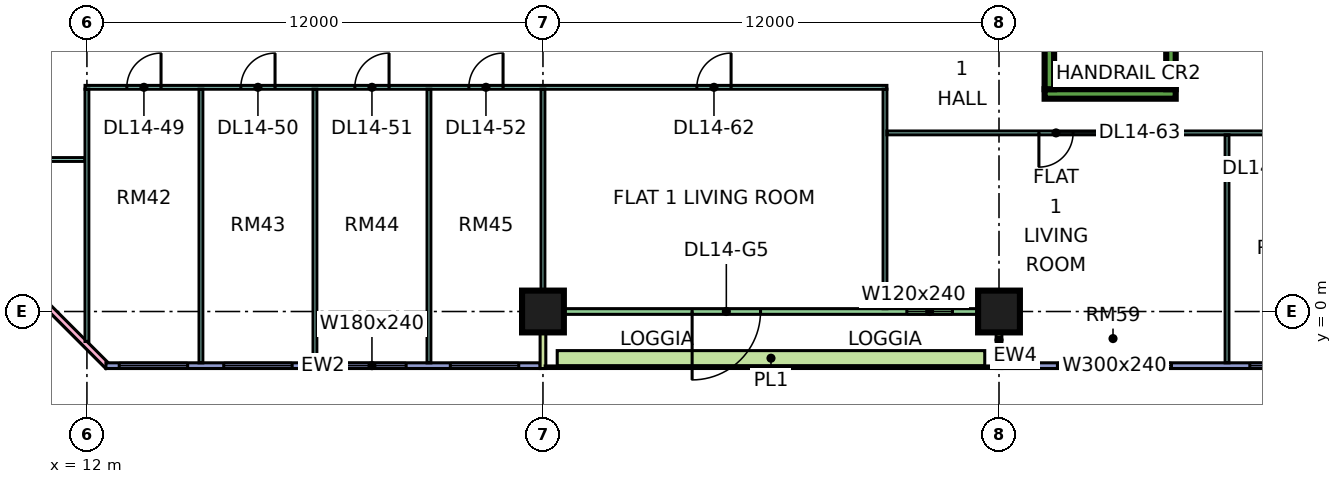
"""IFC4 building model, lengths in metres.
Left out: names, types, materials, properties, quantities, classifications, styles, units other than length and angle.
Written with IfcOpenShell. Run it as: python <this file> out.ifc"""

import sys

from ifc_helpers import new_model, si_unit, direction, frame, frame_2d, origin, origin_2d, place, context, subcontext, project, spatial, rectangle, extrude, element, fill, save


model = new_model("IFC4")
c1 = context("Model", 3, precision=1e-05, world=origin(), true_north=direction((0.0, 1.0)))
c2 = subcontext(c1, "Body", "Model", "MODEL_VIEW")
j1 = project(units=[si_unit("LENGTHUNIT", "METRE"), si_unit("PLANEANGLEUNIT", "RADIAN")], contexts=[c1])
p1 = place(None, origin())
s1 = spatial("IfcSite", under=j1, at=p1, CompositionType="ELEMENT")
p2 = place(p1, origin())
s2 = spatial("IfcBuilding", under=s1, at=p2, CompositionType="ELEMENT")
p3 = place(p2, frame((0.0, 0.0, 67.65)))
s3 = spatial("IfcBuildingStorey", under=s2, at=p3, CompositionType="ELEMENT", Elevation=67.65)
for number, where, z_axis, x_axis in (
    (1, (24.0, 0.0, 0.0), (0.0, 0.0, 1.0), (1.0, 0.0, 0.0)),
    (2, (36.0, 0.0, 0.0), (0.0, 0.0, 1.0), (1.0, 0.0, 0.0)),
):
    element("IfcColumn", number, at=place(p3, frame(where, z_axis=z_axis, x_axis=x_axis)), inside=s3, PredefinedType="COLUMN", context=c2, shape_type="SweptSolid", body=[
        extrude(rectangle(XDim=1.1, YDim=1.1, at=origin_2d()), origin(), (0.0, 0.0, 1.0), 3.75),
    ])
p4 = place(p3, frame((37.2, 5.725, 0.0), z_axis=(0.0, 0.0, 1.0), x_axis=(1.0, 0.0, 0.0)))
e3 = element("IfcWall", 3, at=p4, inside=s3, PredefinedType="SHEAR", context=c2, shape_type="SweptSolid", body=[
    extrude(rectangle(XDim=3.45, YDim=0.25, at=frame_2d((1.725, 0.0))), origin(), (0.0, 0.0, 1.0), 3.75),
])
for number, where, z_axis, x_axis in (
    (4, (37.325, 5.85, 0.0), (0.0, 0.0, 1.0), (0.0, 1.0, 0.0)),
    (5, (40.525, 5.85, 0.0), (0.0, 0.0, 1.0), (0.0, 1.0, 0.0)),
):
    element("IfcWall", number, at=place(p3, frame(where, z_axis=z_axis, x_axis=x_axis)), inside=s3, PredefinedType="SHEAR", context=c2, shape_type="SweptSolid", body=[
        extrude(rectangle(XDim=6.5, YDim=0.25, at=frame_2d((3.25, 0.0))), origin(), (0.0, 0.0, 1.0), 3.75),
    ])
p5 = place(p3, frame((-1.447, 12.553, 0.0), z_axis=(0.0, 0.0, 1.0), x_axis=(0.707106781187, -0.707106781187, 0.0)))
e6 = element("IfcWall", 6, at=p5, inside=s3, PredefinedType="SOLIDWALL", context=c2, shape_type="SweptSolid", body=[
    extrude(rectangle(XDim=19.799, YDim=0.15, at=frame_2d((9.899, 0.0))), origin(), (0.0, 0.0, 1.0), 3.35),
])
p6 = place(p5, frame((2.212, 0.0, 0.45)))
e7 = element("IfcOpeningElement", 7, at=p6, cuts=e6, PredefinedType="OPENING", context=c2, shape_type="SweptSolid", body=[
    extrude(rectangle(XDim=3.0, YDim=2.4, at=frame_2d((1.5, 1.2))), frame((0.0, 0.085, 0.0), z_axis=(0.0, -1.0, 0.0), x_axis=(1.0, 0.0, 0.0)), (0.0, 0.0, 1.0), 0.17),
])
p7 = place(p5, frame((10.216, 0.0, 0.45)))
e8 = element("IfcOpeningElement", 8, at=p7, cuts=e6, PredefinedType="OPENING", context=c2, shape_type="SweptSolid", body=[
    extrude(rectangle(XDim=3.0, YDim=2.4, at=frame_2d((1.5, 1.2))), frame((0.0, 0.085, 0.0), z_axis=(0.0, -1.0, 0.0), x_axis=(1.0, 0.0, 0.0)), (0.0, 0.0, 1.0), 0.17),
])
p8 = place(p3, frame((12.5, -1.425, 0.0), z_axis=(0.0, 0.0, 1.0), x_axis=(1.0, 0.0, 0.0)))
e9 = element("IfcWall", 9, at=p8, inside=s3, PredefinedType="SOLIDWALL", context=c2, shape_type="SweptSolid", body=[
    extrude(rectangle(XDim=11.425, YDim=0.15, at=frame_2d((5.712, 0.0))), origin(), (0.0, 0.0, 1.0), 3.35),
])
p9 = place(p8, frame((0.35, 0.0, 0.45)))
e10 = element("IfcOpeningElement", 10, at=p9, cuts=e9, PredefinedType="OPENING", context=c2, shape_type="SweptSolid", body=[
    extrude(rectangle(XDim=1.8, YDim=2.4, at=frame_2d((0.9, 1.2))), frame((0.0, 0.085, 0.0), z_axis=(0.0, -1.0, 0.0), x_axis=(1.0, 0.0, 0.0)), (0.0, 0.0, 1.0), 0.17),
])
p10 = place(p8, frame((3.1, 0.0, 0.45)))
e11 = element("IfcOpeningElement", 11, at=p10, cuts=e9, PredefinedType="OPENING", context=c2, shape_type="SweptSolid", body=[
    extrude(rectangle(XDim=1.8, YDim=2.4, at=frame_2d((0.9, 1.2))), frame((0.0, 0.085, 0.0), z_axis=(0.0, -1.0, 0.0), x_axis=(1.0, 0.0, 0.0)), (0.0, 0.0, 1.0), 0.17),
])
p11 = place(p8, frame((6.1, 0.0, 0.45)))
e12 = element("IfcOpeningElement", 12, at=p11, cuts=e9, PredefinedType="OPENING", context=c2, shape_type="SweptSolid", body=[
    extrude(rectangle(XDim=1.8, YDim=2.4, at=frame_2d((0.9, 1.2))), frame((0.0, 0.085, 0.0), z_axis=(0.0, -1.0, 0.0), x_axis=(1.0, 0.0, 0.0)), (0.0, 0.0, 1.0), 0.17),
])
p12 = place(p8, frame((9.062, 0.0, 0.45)))
e13 = element("IfcOpeningElement", 13, at=p12, cuts=e9, PredefinedType="OPENING", context=c2, shape_type="SweptSolid", body=[
    extrude(rectangle(XDim=1.8, YDim=2.4, at=frame_2d((0.9, 1.2))), frame((0.0, 0.085, 0.0), z_axis=(0.0, -1.0, 0.0), x_axis=(1.0, 0.0, 0.0)), (0.0, 0.0, 1.0), 0.17),
])
p13 = place(p3, frame((24.075, 0.0, 0.0), z_axis=(0.0, 0.0, 1.0), x_axis=(1.0, 0.0, 0.0)))
e14 = element("IfcWall", 14, at=p13, inside=s3, PredefinedType="SOLIDWALL", context=c2, shape_type="SweptSolid", body=[
    extrude(rectangle(XDim=11.85, YDim=0.15, at=frame_2d((5.925, 0.0))), origin(), (0.0, 0.0, 1.0), 3.35),
])
p14 = place(p13, frame((3.85, 0.0, 0.0)))
e15 = element("IfcOpeningElement", 15, at=p14, cuts=e14, PredefinedType="OPENING", context=c2, shape_type="SweptSolid", body=[
    extrude(rectangle(XDim=1.8, YDim=2.4, at=frame_2d((0.9, 1.2))), frame((0.0, 0.085, 0.0), z_axis=(0.0, -1.0, 0.0), x_axis=(1.0, 0.0, 0.0)), (0.0, 0.0, 1.0), 0.17),
])
p15 = place(p13, frame((9.5, 0.0, 0.45)))
e16 = element("IfcOpeningElement", 16, at=p15, cuts=e14, PredefinedType="OPENING", context=c2, shape_type="SweptSolid", body=[
    extrude(rectangle(XDim=1.2, YDim=2.4, at=frame_2d((0.6, 1.2))), frame((0.0, 0.085, 0.0), z_axis=(0.0, -1.0, 0.0), x_axis=(1.0, 0.0, 0.0)), (0.0, 0.0, 1.0), 0.17),
])
for number, where, z_axis, x_axis in (
    (17, (24.0, -1.5, 0.0), (0.0, 0.0, 1.0), (0.0, 1.0, 0.0)),
    (18, (36.0, -1.5, 0.0), (0.0, 0.0, 1.0), (0.0, 1.0, 0.0)),
):
    element("IfcWall", number, at=place(p3, frame(where, z_axis=z_axis, x_axis=x_axis)), inside=s3, PredefinedType="SOLIDWALL", context=c2, shape_type="SweptSolid", body=[
        extrude(rectangle(XDim=1.5, YDim=0.15, at=frame_2d((0.75, 0.0))), origin(), (0.0, 0.0, 1.0), 3.35),
    ])
p16 = place(p3, frame((36.075, -1.425, 0.0), z_axis=(0.0, 0.0, 1.0), x_axis=(1.0, 0.0, 0.0)))
e19 = element("IfcWall", 19, at=p16, inside=s3, PredefinedType="SOLIDWALL", context=c2, shape_type="SweptSolid", body=[
    extrude(rectangle(XDim=11.85, YDim=0.15, at=frame_2d((5.925, 0.0))), origin(), (0.0, 0.0, 1.0), 3.35),
])
p17 = place(p16, frame((1.462, 0.0, 0.45)))
e20 = element("IfcOpeningElement", 20, at=p17, cuts=e19, PredefinedType="OPENING", context=c2, shape_type="SweptSolid", body=[
    extrude(rectangle(XDim=3.0, YDim=2.4, at=frame_2d((1.5, 1.2))), frame((0.0, 0.085, 0.0), z_axis=(0.0, -1.0, 0.0), x_axis=(1.0, 0.0, 0.0)), (0.0, 0.0, 1.0), 0.17),
])
p18 = place(p16, frame((6.525, 0.0, 0.45)))
e21 = element("IfcOpeningElement", 21, at=p18, cuts=e19, PredefinedType="OPENING", context=c2, shape_type="SweptSolid", body=[
    extrude(rectangle(XDim=1.8, YDim=2.4, at=frame_2d((0.9, 1.2))), frame((0.0, 0.085, 0.0), z_axis=(0.0, -1.0, 0.0), x_axis=(1.0, 0.0, 0.0)), (0.0, 0.0, 1.0), 0.17),
])
p19 = place(p16, frame((9.488, 0.0, 0.45)))
e22 = element("IfcOpeningElement", 22, at=p19, cuts=e19, PredefinedType="OPENING", context=c2, shape_type="SweptSolid", body=[
    extrude(rectangle(XDim=1.8, YDim=2.4, at=frame_2d((0.9, 1.2))), frame((0.0, 0.085, 0.0), z_axis=(0.0, -1.0, 0.0), x_axis=(1.0, 0.0, 0.0)), (0.0, 0.0, 1.0), 0.17),
])
p20 = place(p3, frame((24.375, -1.229, 0.0), z_axis=(0.0, 0.0, 1.0), x_axis=(1.0, 0.0, 0.0)))
e23 = element("IfcWall", 23, at=p20, inside=s3, PredefinedType="SOLIDWALL", context=c2, shape_type="SweptSolid", body=[
    extrude(rectangle(XDim=11.25, YDim=0.4, at=frame_2d((5.625, 0.0))), origin(), (0.0, 0.0, 1.0), 0.7),
])
p21 = place(p3, frame((9.05, 4.0, 0.0), z_axis=(0.0, 0.0, 1.0), x_axis=(1.0, 0.0, 0.0)))
e24 = element("IfcWall", 24, at=p21, inside=s3, PredefinedType="PARTITIONING", context=c2, shape_type="SweptSolid", body=[
    extrude(rectangle(XDim=2.9, YDim=0.1, at=frame_2d((1.45, 0.0))), origin(), (0.0, 0.0, 1.0), 3.35),
])
p22 = place(p3, frame((11.95, 5.9, 0.0), z_axis=(0.0, 0.0, 1.0), x_axis=(1.0, 0.0, 0.0)))
e25 = element("IfcWall", 25, at=p22, inside=s3, PredefinedType="PARTITIONING", context=c2, shape_type="SweptSolid", body=[
    extrude(rectangle(XDim=21.1, YDim=0.1, at=frame_2d((10.55, 0.0))), origin(), (0.0, 0.0, 1.0), 3.35),
])
p23 = place(p22, frame((1.1, 0.0, 0.0)))
e26 = element("IfcOpeningElement", 26, at=p23, cuts=e25, PredefinedType="OPENING", context=c2, shape_type="SweptSolid", body=[
    extrude(rectangle(XDim=0.9, YDim=2.1, at=frame_2d((0.45, 1.05))), frame((0.0, 0.06, 0.0), z_axis=(0.0, -1.0, 0.0), x_axis=(1.0, 0.0, 0.0)), (0.0, 0.0, 1.0), 0.12),
])
p24 = place(p22, frame((4.1, 0.0, 0.0)))
e27 = element("IfcOpeningElement", 27, at=p24, cuts=e25, PredefinedType="OPENING", context=c2, shape_type="SweptSolid", body=[
    extrude(rectangle(XDim=0.9, YDim=2.1, at=frame_2d((0.45, 1.05))), frame((0.0, 0.06, 0.0), z_axis=(0.0, -1.0, 0.0), x_axis=(1.0, 0.0, 0.0)), (0.0, 0.0, 1.0), 0.12),
])
p25 = place(p22, frame((7.1, 0.0, 0.0)))
e28 = element("IfcOpeningElement", 28, at=p25, cuts=e25, PredefinedType="OPENING", context=c2, shape_type="SweptSolid", body=[
    extrude(rectangle(XDim=0.9, YDim=2.1, at=frame_2d((0.45, 1.05))), frame((0.0, 0.06, 0.0), z_axis=(0.0, -1.0, 0.0), x_axis=(1.0, 0.0, 0.0)), (0.0, 0.0, 1.0), 0.12),
])
p26 = place(p22, frame((10.1, 0.0, 0.0)))
e29 = element("IfcOpeningElement", 29, at=p26, cuts=e25, PredefinedType="OPENING", context=c2, shape_type="SweptSolid", body=[
    extrude(rectangle(XDim=0.9, YDim=2.1, at=frame_2d((0.45, 1.05))), frame((0.0, 0.06, 0.0), z_axis=(0.0, -1.0, 0.0), x_axis=(1.0, 0.0, 0.0)), (0.0, 0.0, 1.0), 0.12),
])
p27 = place(p22, frame((16.1, 0.0, 0.0)))
e30 = element("IfcOpeningElement", 30, at=p27, cuts=e25, PredefinedType="OPENING", context=c2, shape_type="SweptSolid", body=[
    extrude(rectangle(XDim=0.9, YDim=2.1, at=frame_2d((0.45, 1.05))), frame((0.0, 0.06, 0.0), z_axis=(0.0, -1.0, 0.0), x_axis=(1.0, 0.0, 0.0)), (0.0, 0.0, 1.0), 0.12),
])
p28 = place(p3, frame((12.0, -0.788, 0.0), z_axis=(0.0, 0.0, 1.0), x_axis=(0.0, 1.0, 0.0)))
e31 = element("IfcWall", 31, at=p28, inside=s3, PredefinedType="PARTITIONING", context=c2, shape_type="SweptSolid", body=[
    extrude(rectangle(XDim=6.638, YDim=0.1, at=frame_2d((3.319, 0.0))), origin(), (0.0, 0.0, 1.0), 3.35),
])
for number, where, z_axis, x_axis in (
    (32, (15.0, -1.351, 0.0), (0.0, 0.0, 1.0), (0.0, 1.0, 0.0)),
    (33, (18.0, -1.351, 0.0), (0.0, 0.0, 1.0), (0.0, 1.0, 0.0)),
    (34, (21.0, -1.351, 0.0), (0.0, 0.0, 1.0), (0.0, 1.0, 0.0)),
):
    element("IfcWall", number, at=place(p3, frame(where, z_axis=z_axis, x_axis=x_axis)), inside=s3, PredefinedType="PARTITIONING", context=c2, shape_type="SweptSolid", body=[
        extrude(rectangle(XDim=7.201, YDim=0.1, at=frame_2d((3.601, 0.0))), origin(), (0.0, 0.0, 1.0), 3.35),
    ])
p29 = place(p3, frame((24.0, 0.0, 0.0), z_axis=(0.0, 0.0, 1.0), x_axis=(0.0, 1.0, 0.0)))
e35 = element("IfcWall", 35, at=p29, inside=s3, PredefinedType="PARTITIONING", context=c2, shape_type="SweptSolid", body=[
    extrude(rectangle(XDim=5.85, YDim=0.1, at=frame_2d((2.925, 0.0))), origin(), (0.0, 0.0, 1.0), 3.35),
])
p30 = place(p3, frame((33.0, 0.074, 0.0), z_axis=(0.0, 0.0, 1.0), x_axis=(0.0, 1.0, 0.0)))
e36 = element("IfcWall", 36, at=p30, inside=s3, PredefinedType="PARTITIONING", context=c2, shape_type="SweptSolid", body=[
    extrude(rectangle(XDim=5.776, YDim=0.1, at=frame_2d((2.888, 0.0))), origin(), (0.0, 0.0, 1.0), 3.35),
])
p31 = place(p3, frame((33.05, 4.7, 0.0), z_axis=(0.0, 0.0, 1.0), x_axis=(1.0, 0.0, 0.0)))
e37 = element("IfcWall", 37, at=p31, inside=s3, PredefinedType="PARTITIONING", context=c2, shape_type="SweptSolid", body=[
    extrude(rectangle(XDim=20.85, YDim=0.1, at=frame_2d((10.425, 0.0))), origin(), (0.0, 0.0, 1.0), 3.35),
])
p32 = place(p31, frame((10.0, 0.0, 0.0)))
e38 = element("IfcOpeningElement", 38, at=p32, cuts=e37, PredefinedType="OPENING", context=c2, shape_type="SweptSolid", body=[
    extrude(rectangle(XDim=0.9, YDim=2.1, at=frame_2d((0.45, 1.05))), frame((0.0, 0.06, 0.0), z_axis=(0.0, -1.0, 0.0), x_axis=(1.0, 0.0, 0.0)), (0.0, 0.0, 1.0), 0.12),
])
p33 = place(p31, frame((13.0, 0.0, 0.0)))
e39 = element("IfcOpeningElement", 39, at=p33, cuts=e37, PredefinedType="OPENING", context=c2, shape_type="SweptSolid", body=[
    extrude(rectangle(XDim=0.9, YDim=2.1, at=frame_2d((0.45, 1.05))), frame((0.0, 0.06, 0.0), z_axis=(0.0, -1.0, 0.0), x_axis=(1.0, 0.0, 0.0)), (0.0, 0.0, 1.0), 0.12),
])
p34 = place(p31, frame((16.0, 0.0, 0.0)))
e40 = element("IfcOpeningElement", 40, at=p34, cuts=e37, PredefinedType="OPENING", context=c2, shape_type="SweptSolid", body=[
    extrude(rectangle(XDim=0.9, YDim=2.1, at=frame_2d((0.45, 1.05))), frame((0.0, 0.06, 0.0), z_axis=(0.0, -1.0, 0.0), x_axis=(1.0, 0.0, 0.0)), (0.0, 0.0, 1.0), 0.12),
])
p35 = place(p31, frame((19.0, 0.0, 0.0)))
e41 = element("IfcOpeningElement", 41, at=p35, cuts=e37, PredefinedType="OPENING", context=c2, shape_type="SweptSolid", body=[
    extrude(rectangle(XDim=0.9, YDim=2.1, at=frame_2d((0.45, 1.05))), frame((0.0, 0.06, 0.0), z_axis=(0.0, -1.0, 0.0), x_axis=(1.0, 0.0, 0.0)), (0.0, 0.0, 1.0), 0.12),
])
p36 = place(p31, frame((4.0, 0.0, 0.0)))
e42 = element("IfcOpeningElement", 42, at=p36, cuts=e37, PredefinedType="OPENING", context=c2, shape_type="SweptSolid", body=[
    extrude(rectangle(XDim=0.9, YDim=2.1, at=frame_2d((0.45, 1.05))), frame((0.0, 0.06, 0.0), z_axis=(0.0, -1.0, 0.0), x_axis=(1.0, 0.0, 0.0)), (0.0, 0.0, 1.0), 0.12),
])
p37 = place(p3, frame((42.0, -1.35, 0.0), z_axis=(0.0, 0.0, 1.0), x_axis=(0.0, 1.0, 0.0)))
e43 = element("IfcWall", 43, at=p37, inside=s3, PredefinedType="PARTITIONING", context=c2, shape_type="SweptSolid", body=[
    extrude(rectangle(XDim=6.0, YDim=0.1, at=frame_2d((3.0, 0.0))), origin(), (0.0, 0.0, 1.0), 3.35),
])
p38 = place(p9, origin())
e44 = element("IfcWindow", 44, at=p38, inside=s3, PartitioningType="SINGLE_PANEL", PredefinedType="WINDOW", context=c2, shape_type="SweptSolid", body=[
    extrude(rectangle(XDim=1.8, YDim=2.4, at=frame_2d((0.9, 1.2))), frame((0.0, 0.03, 0.0), z_axis=(0.0, -1.0, 0.0), x_axis=(1.0, 0.0, 0.0)), (0.0, 0.0, 1.0), 0.06),
])
fill(e10, e44)
p39 = place(p10, origin())
e45 = element("IfcWindow", 45, at=p39, inside=s3, PartitioningType="SINGLE_PANEL", PredefinedType="WINDOW", context=c2, shape_type="SweptSolid", body=[
    extrude(rectangle(XDim=1.8, YDim=2.4, at=frame_2d((0.9, 1.2))), frame((0.0, 0.03, 0.0), z_axis=(0.0, -1.0, 0.0), x_axis=(1.0, 0.0, 0.0)), (0.0, 0.0, 1.0), 0.06),
])
fill(e11, e45)
p40 = place(p11, origin())
e46 = element("IfcWindow", 46, at=p40, inside=s3, PartitioningType="SINGLE_PANEL", PredefinedType="WINDOW", context=c2, shape_type="SweptSolid", body=[
    extrude(rectangle(XDim=1.8, YDim=2.4, at=frame_2d((0.9, 1.2))), frame((0.0, 0.03, 0.0), z_axis=(0.0, -1.0, 0.0), x_axis=(1.0, 0.0, 0.0)), (0.0, 0.0, 1.0), 0.06),
])
fill(e12, e46)
p41 = place(p12, origin())
e47 = element("IfcWindow", 47, at=p41, inside=s3, PartitioningType="SINGLE_PANEL", PredefinedType="WINDOW", context=c2, shape_type="SweptSolid", body=[
    extrude(rectangle(XDim=1.8, YDim=2.4, at=frame_2d((0.9, 1.2))), frame((0.0, 0.03, 0.0), z_axis=(0.0, -1.0, 0.0), x_axis=(1.0, 0.0, 0.0)), (0.0, 0.0, 1.0), 0.06),
])
fill(e13, e47)
p42 = place(p14, frame((1.8, 0.0, 0.0), z_axis=(0.0, 0.0, 1.0), x_axis=(-1.0, 0.0, 0.0)))
e48 = element("IfcDoor", 48, at=p42, inside=s3, OperationType="DOUBLE_DOOR_SINGLE_SWING", PredefinedType="DOOR", context=c2, shape_type="SweptSolid", body=[
    extrude(rectangle(XDim=1.8, YDim=2.4, at=frame_2d((0.9, 1.2))), frame((0.0, 0.025, 0.0), z_axis=(0.0, -1.0, 0.0), x_axis=(1.0, 0.0, 0.0)), (0.0, 0.0, 1.0), 0.05),
])
fill(e15, e48)
p43 = place(p15, origin())
e49 = element("IfcWindow", 49, at=p43, inside=s3, PartitioningType="SINGLE_PANEL", PredefinedType="WINDOW", context=c2, shape_type="SweptSolid", body=[
    extrude(rectangle(XDim=1.2, YDim=2.4, at=frame_2d((0.6, 1.2))), frame((0.0, 0.03, 0.0), z_axis=(0.0, -1.0, 0.0), x_axis=(1.0, 0.0, 0.0)), (0.0, 0.0, 1.0), 0.06),
])
fill(e16, e49)
p44 = place(p17, origin())
e50 = element("IfcWindow", 50, at=p44, inside=s3, PartitioningType="SINGLE_PANEL", PredefinedType="WINDOW", context=c2, shape_type="SweptSolid", body=[
    extrude(rectangle(XDim=3.0, YDim=2.4, at=frame_2d((1.5, 1.2))), frame((0.0, 0.03, 0.0), z_axis=(0.0, -1.0, 0.0), x_axis=(1.0, 0.0, 0.0)), (0.0, 0.0, 1.0), 0.06),
])
fill(e20, e50)
p45 = place(p18, origin())
e51 = element("IfcWindow", 51, at=p45, inside=s3, PartitioningType="SINGLE_PANEL", PredefinedType="WINDOW", context=c2, shape_type="SweptSolid", body=[
    extrude(rectangle(XDim=1.8, YDim=2.4, at=frame_2d((0.9, 1.2))), frame((0.0, 0.03, 0.0), z_axis=(0.0, -1.0, 0.0), x_axis=(1.0, 0.0, 0.0)), (0.0, 0.0, 1.0), 0.06),
])
fill(e21, e51)
p46 = place(p23, frame((0.9, 0.0, 0.0), z_axis=(0.0, 0.0, 1.0), x_axis=(-1.0, 0.0, 0.0)))
e52 = element("IfcDoor", 52, at=p46, inside=s3, OperationType="SINGLE_SWING_RIGHT", PredefinedType="DOOR", context=c2, shape_type="SweptSolid", body=[
    extrude(rectangle(XDim=0.9, YDim=2.1, at=frame_2d((0.45, 1.05))), frame((0.0, 0.025, 0.0), z_axis=(0.0, -1.0, 0.0), x_axis=(1.0, 0.0, 0.0)), (0.0, 0.0, 1.0), 0.05),
])
fill(e26, e52)
p47 = place(p24, frame((0.9, 0.0, 0.0), z_axis=(0.0, 0.0, 1.0), x_axis=(-1.0, 0.0, 0.0)))
e53 = element("IfcDoor", 53, at=p47, inside=s3, OperationType="SINGLE_SWING_RIGHT", PredefinedType="DOOR", context=c2, shape_type="SweptSolid", body=[
    extrude(rectangle(XDim=0.9, YDim=2.1, at=frame_2d((0.45, 1.05))), frame((0.0, 0.025, 0.0), z_axis=(0.0, -1.0, 0.0), x_axis=(1.0, 0.0, 0.0)), (0.0, 0.0, 1.0), 0.05),
])
fill(e27, e53)
p48 = place(p25, frame((0.9, 0.0, 0.0), z_axis=(0.0, 0.0, 1.0), x_axis=(-1.0, 0.0, 0.0)))
e54 = element("IfcDoor", 54, at=p48, inside=s3, OperationType="SINGLE_SWING_RIGHT", PredefinedType="DOOR", context=c2, shape_type="SweptSolid", body=[
    extrude(rectangle(XDim=0.9, YDim=2.1, at=frame_2d((0.45, 1.05))), frame((0.0, 0.025, 0.0), z_axis=(0.0, -1.0, 0.0), x_axis=(1.0, 0.0, 0.0)), (0.0, 0.0, 1.0), 0.05),
])
fill(e28, e54)
p49 = place(p26, frame((0.9, 0.0, 0.0), z_axis=(0.0, 0.0, 1.0), x_axis=(-1.0, 0.0, 0.0)))
e55 = element("IfcDoor", 55, at=p49, inside=s3, OperationType="SINGLE_SWING_RIGHT", PredefinedType="DOOR", context=c2, shape_type="SweptSolid", body=[
    extrude(rectangle(XDim=0.9, YDim=2.1, at=frame_2d((0.45, 1.05))), frame((0.0, 0.025, 0.0), z_axis=(0.0, -1.0, 0.0), x_axis=(1.0, 0.0, 0.0)), (0.0, 0.0, 1.0), 0.05),
])
fill(e29, e55)
p50 = place(p27, frame((0.9, 0.0, 0.0), z_axis=(0.0, 0.0, 1.0), x_axis=(-1.0, 0.0, 0.0)))
e56 = element("IfcDoor", 56, at=p50, inside=s3, OperationType="SINGLE_SWING_RIGHT", PredefinedType="DOOR", context=c2, shape_type="SweptSolid", body=[
    extrude(rectangle(XDim=0.9, YDim=2.1, at=frame_2d((0.45, 1.05))), frame((0.0, 0.025, 0.0), z_axis=(0.0, -1.0, 0.0), x_axis=(1.0, 0.0, 0.0)), (0.0, 0.0, 1.0), 0.05),
])
fill(e30, e56)
p51 = place(p36, frame((0.9, 0.0, 0.0), z_axis=(0.0, 0.0, 1.0), x_axis=(-1.0, 0.0, 0.0)))
e57 = element("IfcDoor", 57, at=p51, inside=s3, OperationType="SINGLE_SWING_LEFT", PredefinedType="DOOR", context=c2, shape_type="SweptSolid", body=[
    extrude(rectangle(XDim=0.9, YDim=2.1, at=frame_2d((0.45, 1.05))), frame((0.0, 0.025, 0.0), z_axis=(0.0, -1.0, 0.0), x_axis=(1.0, 0.0, 0.0)), (0.0, 0.0, 1.0), 0.05),
])
fill(e42, e57)
save(model, sys.argv[1])
